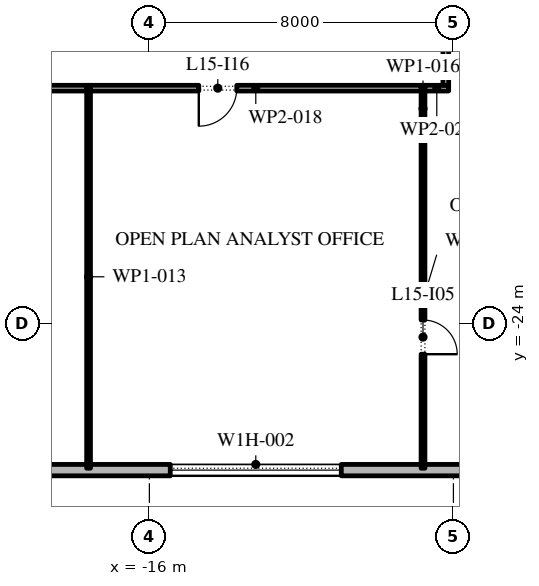
"""IFC4 building model, lengths in metres.
Left out: names, types, materials, properties, quantities, classifications, styles, units other than length and angle.
Written with IfcOpenShell. Run it as: python <this file> out.ifc"""

import sys

from ifc_helpers import new_model, si_unit, direction, frame, frame_2d, origin, place, context, subcontext, project, spatial, rectangle, extrude, element, fill, save


model = new_model("IFC4")
c1 = context("Model", 3, precision=1e-05, world=origin(), true_north=direction((0.0, 1.0)))
c2 = subcontext(c1, "Body", "Model", "MODEL_VIEW")
j1 = project(units=[si_unit("LENGTHUNIT", "METRE"), si_unit("PLANEANGLEUNIT", "RADIAN")], contexts=[c1])
p1 = place(None, origin())
s1 = spatial("IfcSite", under=j1, at=p1, CompositionType="ELEMENT")
p2 = place(p1, origin())
s2 = spatial("IfcBuilding", under=s1, at=p2, CompositionType="ELEMENT")
p3 = place(p2, frame((0.0, 0.0, 73.2)))
s3 = spatial("IfcBuildingStorey", under=s2, at=p3, CompositionType="ELEMENT", Elevation=73.2)
p4 = place(p3, frame((-26.1, -27.85, 0.0), z_axis=(0.0, 0.0, 1.0), x_axis=(1.0, 0.0, 0.0)))
e1 = element("IfcWall", 1, at=p4, inside=s3, PredefinedType="STANDARD", context=c2, shape_type="SweptSolid", body=[
    extrude(rectangle(XDim=52.5, YDim=0.3, at=frame_2d((26.25, 0.0))), origin(), (0.0, 0.0, 1.0), 4.0),
])
p5 = place(p4, frame((2.0, 0.0, 0.45)))
e2 = element("IfcOpeningElement", 2, at=p5, cuts=e1, PredefinedType="OPENING", context=c2, shape_type="SweptSolid", body=[
    extrude(rectangle(XDim=4.5, YDim=2.75, at=frame_2d((2.25, 1.375))), frame((0.0, 0.16, 0.0), z_axis=(0.0, -1.0, 0.0), x_axis=(1.0, 0.0, 0.0)), (0.0, 0.0, 1.0), 0.32),
])
p6 = place(p4, frame((10.65, 0.0, 0.45)))
e3 = element("IfcOpeningElement", 3, at=p6, cuts=e1, PredefinedType="OPENING", context=c2, shape_type="SweptSolid", body=[
    extrude(rectangle(XDim=4.5, YDim=2.75, at=frame_2d((2.25, 1.375))), frame((0.0, 0.16, 0.0), z_axis=(0.0, -1.0, 0.0), x_axis=(1.0, 0.0, 0.0)), (0.0, 0.0, 1.0), 0.32),
])
p7 = place(p4, frame((20.5, 0.0, 0.0)))
e4 = element("IfcOpeningElement", 4, at=p7, cuts=e1, PredefinedType="OPENING", context=c2, shape_type="SweptSolid", body=[
    extrude(rectangle(XDim=2.4, YDim=3.5, at=frame_2d((1.2, 1.75))), frame((0.0, 0.16, 0.0), z_axis=(0.0, -1.0, 0.0), x_axis=(1.0, 0.0, 0.0)), (0.0, 0.0, 1.0), 0.32),
])
p8 = place(p4, frame((28.25, 0.0, 0.45)))
e5 = element("IfcOpeningElement", 5, at=p8, cuts=e1, PredefinedType="OPENING", context=c2, shape_type="SweptSolid", body=[
    extrude(rectangle(XDim=4.5, YDim=2.75, at=frame_2d((2.25, 1.375))), frame((0.0, 0.16, 0.0), z_axis=(0.0, -1.0, 0.0), x_axis=(1.0, 0.0, 0.0)), (0.0, 0.0, 1.0), 0.32),
])
p9 = place(p4, frame((37.05, 0.0, 0.45)))
e6 = element("IfcOpeningElement", 6, at=p9, cuts=e1, PredefinedType="OPENING", context=c2, shape_type="SweptSolid", body=[
    extrude(rectangle(XDim=4.5, YDim=2.75, at=frame_2d((2.25, 1.375))), frame((0.0, 0.16, 0.0), z_axis=(0.0, -1.0, 0.0), x_axis=(1.0, 0.0, 0.0)), (0.0, 0.0, 1.0), 0.32),
])
p10 = place(p4, frame((45.85, 0.0, 0.45)))
e7 = element("IfcOpeningElement", 7, at=p10, cuts=e1, PredefinedType="OPENING", context=c2, shape_type="SweptSolid", body=[
    extrude(rectangle(XDim=4.5, YDim=2.75, at=frame_2d((2.25, 1.375))), frame((0.0, 0.16, 0.0), z_axis=(0.0, -1.0, 0.0), x_axis=(1.0, 0.0, 0.0)), (0.0, 0.0, 1.0), 0.32),
])
p11 = place(p3, frame((-17.6, -27.8, 0.0), z_axis=(0.0, 0.0, 1.0), x_axis=(0.0, 1.0, 0.0)))
e8 = element("IfcWall", 8, at=p11, inside=s3, PredefinedType="PARTITIONING", context=c2, shape_type="SweptSolid", body=[
    extrude(rectangle(XDim=10.075, YDim=0.1, at=frame_2d((5.038, 0.0))), origin(), (0.0, 0.0, 1.0), 4.0),
])
p12 = place(p3, frame((-17.65, -17.8, 0.0), z_axis=(0.0, 0.0, 1.0), x_axis=(-1.0, 0.0, 0.0)))
e9 = element("IfcWall", 9, at=p12, inside=s3, PredefinedType="PARTITIONING", context=c2, shape_type="SweptSolid", body=[
    extrude(rectangle(XDim=6.075, YDim=0.15, at=frame_2d((3.038, 0.0))), origin(), (0.0, 0.0, 1.0), 4.0),
])
p13 = place(p12, frame((3.25, 0.0, 0.0)))
e10 = element("IfcOpeningElement", 10, at=p13, cuts=e9, PredefinedType="OPENING", context=c2, shape_type="SweptSolid", body=[
    extrude(rectangle(XDim=1.0, YDim=2.1, at=frame_2d((0.5, 1.05))), frame((0.0, 0.085, 0.0), z_axis=(0.0, -1.0, 0.0), x_axis=(1.0, 0.0, 0.0)), (0.0, 0.0, 1.0), 0.17),
])
p14 = place(p3, frame((-8.8, -27.8, 0.0), z_axis=(0.0, 0.0, 1.0), x_axis=(0.0, 1.0, 0.0)))
e11 = element("IfcWall", 11, at=p14, inside=s3, PredefinedType="PARTITIONING", context=c2, shape_type="SweptSolid", body=[
    extrude(rectangle(XDim=8.85, YDim=0.1, at=frame_2d((4.425, 0.0))), origin(), (0.0, 0.0, 1.0), 4.0),
])
p15 = place(p14, frame((3.0, 0.0, 0.0)))
e12 = element("IfcOpeningElement", 12, at=p15, cuts=e11, PredefinedType="OPENING", context=c2, shape_type="SweptSolid", body=[
    extrude(rectangle(XDim=0.9, YDim=2.1, at=frame_2d((0.45, 1.05))), frame((0.0, 0.06, 0.0), z_axis=(0.0, -1.0, 0.0), x_axis=(1.0, 0.0, 0.0)), (0.0, 0.0, 1.0), 0.12),
])
p16 = place(p3, frame((-8.8, -18.95, 0.0), z_axis=(0.0, 0.0, 1.0), x_axis=(0.0, 1.0, 0.0)))
e13 = element("IfcWall", 13, at=p16, inside=s3, PredefinedType="PARTITIONING", context=c2, shape_type="SweptSolid", body=[
    extrude(rectangle(XDim=1.225, YDim=0.1, at=frame_2d((0.612, 0.0))), origin(), (0.0, 0.0, 1.0), 4.0),
])
p17 = place(p3, frame((-8.75, -19.0, 0.0), z_axis=(0.0, 0.0, 1.0), x_axis=(1.0, 0.0, 0.0)))
e14 = element("IfcWall", 14, at=p17, inside=s3, PredefinedType="PARTITIONING", context=c2, shape_type="SweptSolid", body=[
    extrude(rectangle(XDim=8.8, YDim=0.1, at=frame_2d((4.4, 0.0))), origin(), (0.0, 0.0, 1.0), 4.0),
])
p18 = place(p3, frame((-8.85, -17.8, 0.0), z_axis=(0.0, 0.0, 1.0), x_axis=(-1.0, 0.0, 0.0)))
e15 = element("IfcWall", 15, at=p18, inside=s3, PredefinedType="PARTITIONING", context=c2, shape_type="SweptSolid", body=[
    extrude(rectangle(XDim=8.7, YDim=0.15, at=frame_2d((4.35, 0.0))), origin(), (0.0, 0.0, 1.0), 4.0),
])
p19 = place(p18, frame((4.85, 0.0, 0.0)))
e16 = element("IfcOpeningElement", 16, at=p19, cuts=e15, PredefinedType="OPENING", context=c2, shape_type="SweptSolid", body=[
    extrude(rectangle(XDim=1.0, YDim=2.1, at=frame_2d((0.5, 1.05))), frame((0.0, 0.085, 0.0), z_axis=(0.0, -1.0, 0.0), x_axis=(1.0, 0.0, 0.0)), (0.0, 0.0, 1.0), 0.17),
])
p20 = place(p3, frame((-8.125, -17.8, 0.0), z_axis=(0.0, 0.0, 1.0), x_axis=(-1.0, 0.0, 0.0)))
e17 = element("IfcWall", 17, at=p20, inside=s3, PredefinedType="PARTITIONING", context=c2, shape_type="SweptSolid", body=[
    extrude(rectangle(XDim=0.625, YDim=0.15, at=frame_2d((0.312, 0.0))), origin(), (0.0, 0.0, 1.0), 4.0),
])
p21 = place(p3, frame((-8.2, -4.925, 0.0), z_axis=(0.0, 0.0, 1.0), x_axis=(0.0, -1.0, 0.0)))
e18 = element("IfcWall", 18, at=p21, inside=s3, PredefinedType="PARTITIONING", context=c2, shape_type="SweptSolid", body=[
    extrude(rectangle(XDim=12.8, YDim=0.15, at=frame_2d((6.4, 0.0))), origin(), (0.0, 0.0, 1.0), 4.0),
])
p22 = place(p21, frame((7.225, 0.0, 0.0)))
e19 = element("IfcOpeningElement", 19, at=p22, cuts=e18, PredefinedType="OPENING", context=c2, shape_type="SweptSolid", body=[
    extrude(rectangle(XDim=1.0, YDim=2.1, at=frame_2d((0.5, 1.05))), frame((0.0, 0.085, 0.0), z_axis=(0.0, -1.0, 0.0), x_axis=(1.0, 0.0, 0.0)), (0.0, 0.0, 1.0), 0.17),
])
p23 = place(p6, origin())
e20 = element("IfcWindow", 20, at=p23, inside=s3, PartitioningType="DOUBLE_PANEL_VERTICAL", PredefinedType="WINDOW", context=c2, shape_type="SweptSolid", body=[
    extrude(rectangle(XDim=4.5, YDim=2.75, at=frame_2d((2.25, 1.375))), frame((0.0, 0.03, 0.0), z_axis=(0.0, -1.0, 0.0), x_axis=(1.0, 0.0, 0.0)), (0.0, 0.0, 1.0), 0.06),
])
fill(e3, e20)
p24 = place(p15, frame((0.9, 0.0, 0.0), z_axis=(0.0, 0.0, 1.0), x_axis=(-1.0, 0.0, 0.0)))
e21 = element("IfcDoor", 21, at=p24, inside=s3, OperationType="SINGLE_SWING_LEFT", PredefinedType="DOOR", context=c2, shape_type="SweptSolid", body=[
    extrude(rectangle(XDim=0.9, YDim=2.1, at=frame_2d((0.45, 1.05))), frame((0.0, 0.025, 0.0), z_axis=(0.0, -1.0, 0.0), x_axis=(1.0, 0.0, 0.0)), (0.0, 0.0, 1.0), 0.05),
])
fill(e12, e21)
p25 = place(p19, origin())
e22 = element("IfcDoor", 22, at=p25, inside=s3, OperationType="SINGLE_SWING_LEFT", PredefinedType="DOOR", context=c2, shape_type="SweptSolid", body=[
    extrude(rectangle(XDim=1.0, YDim=2.1, at=frame_2d((0.5, 1.05))), frame((0.0, 0.025, 0.0), z_axis=(0.0, -1.0, 0.0), x_axis=(1.0, 0.0, 0.0)), (0.0, 0.0, 1.0), 0.05),
])
fill(e16, e22)
save(model, sys.argv[1])
